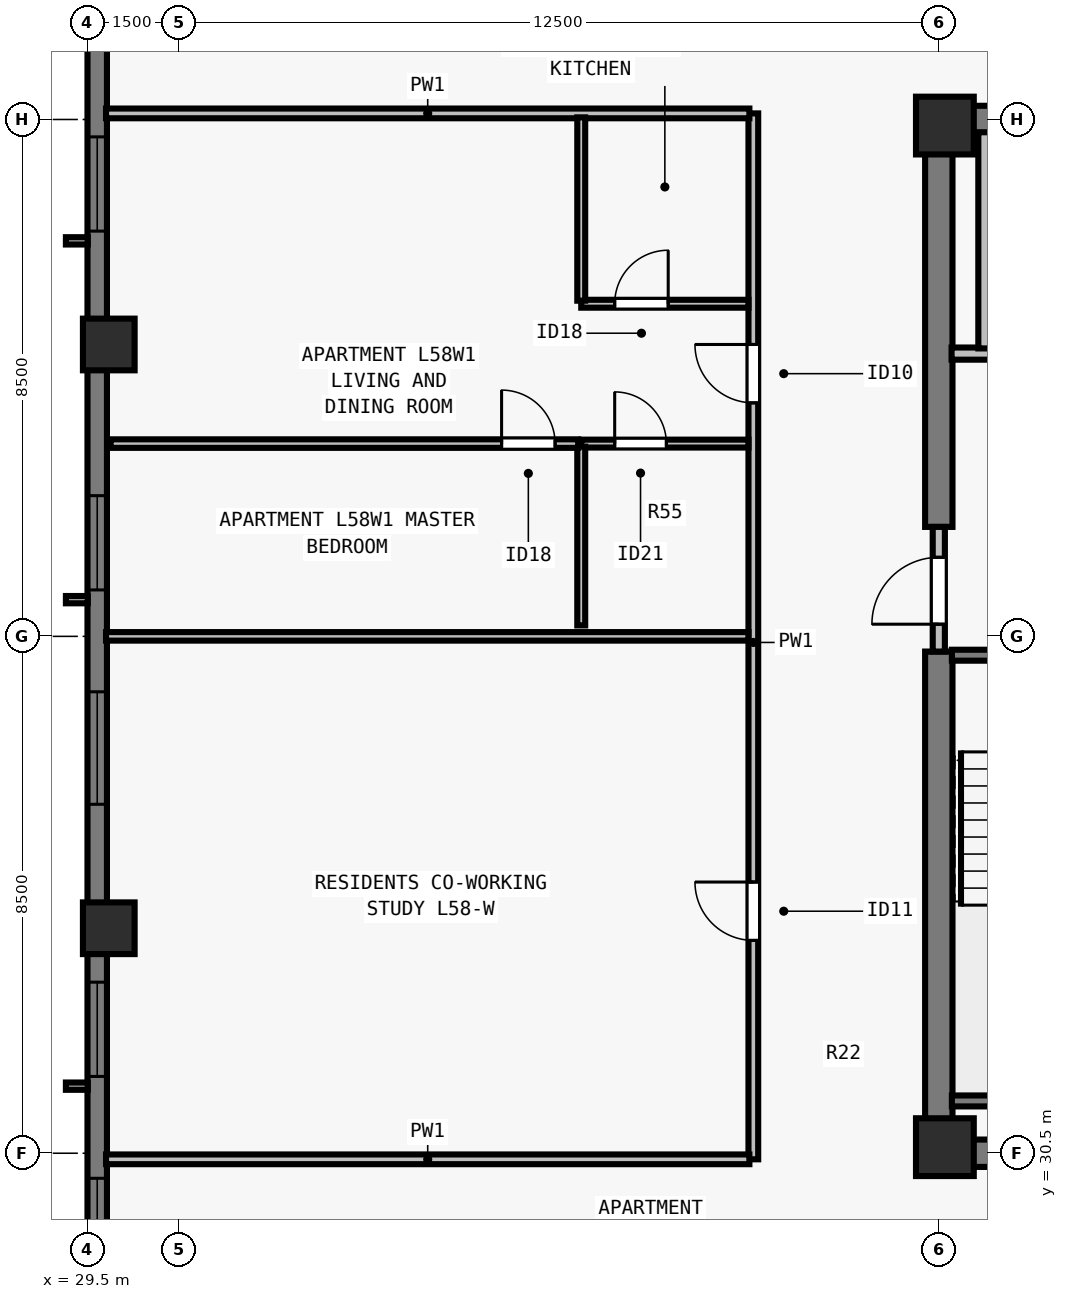
"""IFC4 building model, lengths in metres.
Left out: names, types, materials, properties, quantities, classifications, styles, units other than length and angle.
Written with IfcOpenShell. Run it as: python <this file> out.ifc"""

import sys

from ifc_helpers import new_model, si_unit, direction, frame, frame_2d, origin, origin_2d, place, context, subcontext, project, spatial, rectangle, extrude, element, fill, save


model = new_model("IFC4")
c1 = context("Model", 3, precision=1e-05, world=origin(), true_north=direction((0.0, 1.0)))
c2 = subcontext(c1, "Body", "Model", "MODEL_VIEW")
j1 = project(units=[si_unit("LENGTHUNIT", "METRE"), si_unit("PLANEANGLEUNIT", "RADIAN")], contexts=[c1])
p1 = place(None, origin())
s1 = spatial("IfcSite", under=j1, at=p1, CompositionType="ELEMENT")
p2 = place(p1, origin())
s2 = spatial("IfcBuilding", under=s1, at=p2, CompositionType="ELEMENT")
p3 = place(p2, frame((0.0, 0.0, 213.0)))
s3 = spatial("IfcBuildingStorey", under=s2, at=p3, CompositionType="ELEMENT", Elevation=213.0)
for number, where, z_axis, x_axis in (
    (1, (43.6, 30.6, 0.0), (0.0, 0.0, 1.0), (1.0, 0.0, 0.0)),
    (2, (43.6, 47.4, 0.0), (0.0, 0.0, 1.0), (1.0, 0.0, 0.0)),
):
    element("IfcColumn", number, at=place(p3, frame(where, z_axis=z_axis, x_axis=x_axis)), inside=s3, PredefinedType="COLUMN", context=c2, shape_type="SweptSolid", body=[
        extrude(rectangle(XDim=0.95, YDim=0.95, at=origin_2d()), origin(), (0.0, 0.0, 1.0), 3.5),
    ])
for number, where, z_axis, x_axis in (
    (3, (29.85, 43.8, 0.0), (0.0, 0.0, 1.0), (0.0, 1.0, 0.0)),
    (4, (29.85, 34.2, 0.0), (0.0, 0.0, 1.0), (0.0, 1.0, 0.0)),
):
    element("IfcColumn", number, at=place(p3, frame(where, z_axis=z_axis, x_axis=x_axis)), inside=s3, PredefinedType="COLUMN", context=c2, shape_type="SweptSolid", body=[
        extrude(rectangle(XDim=0.85, YDim=0.85, at=origin_2d()), origin(), (0.0, 0.0, 1.0), 3.5),
    ])
p4 = place(p3, frame((29.66, 21.5, 0.0), z_axis=(0.0, 0.0, 1.0), x_axis=(0.0, 1.0, 0.0)))
e5 = element("IfcWall", 5, at=p4, inside=s3, PredefinedType="SOLIDWALL", context=c2, shape_type="SweptSolid", body=[
    extrude(rectangle(XDim=34.702, YDim=0.32, at=frame_2d((17.351, 0.0))), origin(), (0.0, 0.0, 1.0), 3.29),
])
p5 = place(p4, frame((4.312, 0.0, 0.8)))
e6 = element("IfcOpeningElement", 6, at=p5, cuts=e5, PredefinedType="OPENING", context=c2, shape_type="SweptSolid", body=[
    extrude(rectangle(XDim=1.55, YDim=1.678, at=frame_2d((0.775, 0.839))), frame((0.0, 0.17, 0.0), z_axis=(0.0, -1.0, 0.0), x_axis=(1.0, 0.0, 0.0)), (0.0, 0.0, 1.0), 0.34),
])
p6 = place(p4, frame((6.738, 0.0, 0.8)))
e7 = element("IfcOpeningElement", 7, at=p6, cuts=e5, PredefinedType="OPENING", context=c2, shape_type="SweptSolid", body=[
    extrude(rectangle(XDim=1.85, YDim=1.678, at=frame_2d((0.925, 0.839))), frame((0.0, 0.17, 0.0), z_axis=(0.0, -1.0, 0.0), x_axis=(1.0, 0.0, 0.0)), (0.0, 0.0, 1.0), 0.34),
])
p7 = place(p4, frame((10.263, 0.0, 0.8)))
e8 = element("IfcOpeningElement", 8, at=p7, cuts=e5, PredefinedType="OPENING", context=c2, shape_type="SweptSolid", body=[
    extrude(rectangle(XDim=1.55, YDim=1.678, at=frame_2d((0.775, 0.839))), frame((0.0, 0.17, 0.0), z_axis=(0.0, -1.0, 0.0), x_axis=(1.0, 0.0, 0.0)), (0.0, 0.0, 1.0), 0.34),
])
p8 = place(p4, frame((14.738, 0.0, 0.8)))
e9 = element("IfcOpeningElement", 9, at=p8, cuts=e5, PredefinedType="OPENING", context=c2, shape_type="SweptSolid", body=[
    extrude(rectangle(XDim=1.85, YDim=1.678, at=frame_2d((0.925, 0.839))), frame((0.0, 0.17, 0.0), z_axis=(0.0, -1.0, 0.0), x_axis=(1.0, 0.0, 0.0)), (0.0, 0.0, 1.0), 0.34),
])
p9 = place(p4, frame((18.264, 0.0, 0.8)))
e10 = element("IfcOpeningElement", 10, at=p9, cuts=e5, PredefinedType="OPENING", context=c2, shape_type="SweptSolid", body=[
    extrude(rectangle(XDim=1.55, YDim=1.678, at=frame_2d((0.775, 0.839))), frame((0.0, 0.17, 0.0), z_axis=(0.0, -1.0, 0.0), x_axis=(1.0, 0.0, 0.0)), (0.0, 0.0, 1.0), 0.34),
])
p10 = place(p4, frame((24.164, 0.0, 0.8)))
e11 = element("IfcOpeningElement", 11, at=p10, cuts=e5, PredefinedType="OPENING", context=c2, shape_type="SweptSolid", body=[
    extrude(rectangle(XDim=1.55, YDim=1.678, at=frame_2d((0.775, 0.839))), frame((0.0, 0.17, 0.0), z_axis=(0.0, -1.0, 0.0), x_axis=(1.0, 0.0, 0.0)), (0.0, 0.0, 1.0), 0.34),
])
for number, where, z_axis, x_axis in (
    (12, (43.275, 30.5, 0.0), (0.0, 0.0, 1.0), (1.0, 0.0, 0.0)),
    (13, (43.275, 47.5, 0.0), (0.0, 0.0, 1.0), (1.0, 0.0, 0.0)),
):
    element("IfcWall", number, at=place(p3, frame(where, z_axis=z_axis, x_axis=x_axis)), inside=s3, PredefinedType="SHEAR", context=c2, shape_type="SweptSolid", body=[
        extrude(rectangle(XDim=17.45, YDim=0.45, at=frame_2d((8.725, 0.0))), origin(), (0.0, 0.0, 1.0), 3.29),
    ])
p11 = place(p3, frame((43.5, 30.715, 0.0), z_axis=(0.0, 0.0, 1.0), x_axis=(0.0, 1.0, 0.0)))
e14 = element("IfcWall", 14, at=p11, inside=s3, PredefinedType="SHEAR", context=c2, shape_type="SweptSolid", body=[
    extrude(rectangle(XDim=8.035, YDim=0.45, at=frame_2d((4.018, 0.0))), origin(), (0.0, 0.0, 1.0), 3.29),
])
p12 = place(p3, frame((43.5, 40.8, 0.0), z_axis=(0.0, 0.0, 1.0), x_axis=(0.0, 1.0, 0.0)))
e15 = element("IfcWall", 15, at=p12, inside=s3, PredefinedType="SHEAR", context=c2, shape_type="SweptSolid", body=[
    extrude(rectangle(XDim=6.485, YDim=0.45, at=frame_2d((3.242, 0.0))), origin(), (0.0, 0.0, 1.0), 3.29),
])
p13 = place(p3, frame((43.5, 38.75, 0.0), z_axis=(0.0, 0.0, 1.0), x_axis=(0.0, 1.0, 0.0)))
e16 = element("IfcWall", 16, at=p13, inside=s3, PredefinedType="SOLIDWALL", context=c2, shape_type="SweptSolid", body=[
    extrude(rectangle(XDim=2.05, YDim=0.2, at=frame_2d((1.025, 0.0))), origin(), (0.0, 0.0, 1.0), 3.29),
])
p14 = place(p13, frame((0.45, 0.0, 0.0)))
e17 = element("IfcOpeningElement", 17, at=p14, cuts=e16, PredefinedType="OPENING", context=c2, shape_type="SweptSolid", body=[
    extrude(rectangle(XDim=1.1, YDim=2.15, at=frame_2d((0.55, 1.075))), frame((0.0, 0.11, 0.0), z_axis=(0.0, -1.0, 0.0), x_axis=(1.0, 0.0, 0.0)), (0.0, 0.0, 1.0), 0.22),
])
p15 = place(p3, frame((43.71, 43.65, 0.0), z_axis=(0.0, 0.0, 1.0), x_axis=(1.0, 0.0, 0.0)))
e18 = element("IfcWall", 18, at=p15, inside=s3, PredefinedType="SOLIDWALL", context=c2, shape_type="SweptSolid", body=[
    extrude(rectangle(XDim=3.555, YDim=0.2, at=frame_2d((1.777, 0.0))), origin(), (0.0, 0.0, 1.0), 3.29),
])
p16 = place(p15, frame((1.16, 0.0, 0.0)))
e19 = element("IfcOpeningElement", 19, at=p16, cuts=e18, PredefinedType="OPENING", context=c2, shape_type="SweptSolid", body=[
    extrude(rectangle(XDim=1.1, YDim=2.2, at=frame_2d((0.55, 1.1))), frame((0.0, 0.11, 0.0), z_axis=(0.0, -1.0, 0.0), x_axis=(1.0, 0.0, 0.0)), (0.0, 0.0, 1.0), 0.22),
])
p17 = place(p3, frame((44.25, 43.735, 0.0), z_axis=(0.0, 0.0, 1.0), x_axis=(0.0, 1.0, 0.0)))
e20 = element("IfcWall", 20, at=p17, inside=s3, PredefinedType="SOLIDWALL", context=c2, shape_type="SweptSolid", body=[
    extrude(rectangle(XDim=3.555, YDim=0.2, at=frame_2d((1.777, 0.0))), origin(), (0.0, 0.0, 1.0), 3.29),
])
p18 = place(p3, frame((40.45, 30.4, 0.0), z_axis=(0.0, 0.0, 1.0), x_axis=(0.0, 1.0, 0.0)))
e21 = element("IfcWall", 21, at=p18, inside=s3, PredefinedType="PARTITIONING", context=c2, shape_type="SweptSolid", body=[
    extrude(rectangle(XDim=17.2, YDim=0.16, at=frame_2d((8.6, 0.0))), origin(), (0.0, 0.0, 1.0), 3.29),
])
p19 = place(p18, frame((3.6, 0.0, 0.0)))
e22 = element("IfcOpeningElement", 22, at=p19, cuts=e21, PredefinedType="OPENING", context=c2, shape_type="SweptSolid", body=[
    extrude(rectangle(XDim=0.96, YDim=2.12, at=frame_2d((0.48, 1.06))), frame((0.0, 0.09, 0.0), z_axis=(0.0, -1.0, 0.0), x_axis=(1.0, 0.0, 0.0)), (0.0, 0.0, 1.0), 0.18),
])
p20 = place(p18, frame((12.44, 0.0, 0.0)))
e23 = element("IfcOpeningElement", 23, at=p20, cuts=e21, PredefinedType="OPENING", context=c2, shape_type="SweptSolid", body=[
    extrude(rectangle(XDim=0.96, YDim=2.18, at=frame_2d((0.48, 1.09))), frame((0.0, 0.09, 0.0), z_axis=(0.0, -1.0, 0.0), x_axis=(1.0, 0.0, 0.0)), (0.0, 0.0, 1.0), 0.18),
])
for number, where, z_axis, x_axis in (
    (24, (29.805, 30.4, 0.0), (0.0, 0.0, 1.0), (1.0, 0.0, 0.0)),
    (25, (29.805, 47.6, 0.0), (0.0, 0.0, 1.0), (1.0, 0.0, 0.0)),
):
    element("IfcWall", number, at=place(p3, frame(where, z_axis=z_axis, x_axis=x_axis)), inside=s3, PredefinedType="PARTITIONING", context=c2, shape_type="SweptSolid", body=[
        extrude(rectangle(XDim=10.58, YDim=0.16, at=frame_2d((5.29, 0.0))), origin(), (0.0, 0.0, 1.0), 3.29),
    ])
p21 = place(p3, frame((29.805, 39.0, 0.0), z_axis=(0.0, 0.0, 1.0), x_axis=(1.0, 0.0, 0.0)))
e26 = element("IfcWall", 26, at=p21, inside=s3, PredefinedType="PARTITIONING", context=c2, shape_type="SweptSolid", body=[
    extrude(rectangle(XDim=10.565, YDim=0.14, at=frame_2d((5.283, 0.0))), origin(), (0.0, 0.0, 1.0), 2.958),
])
p22 = place(p3, frame((37.62, 42.17, 0.0), z_axis=(0.0, 0.0, 1.0), x_axis=(1.0, 0.0, 0.0)))
e27 = element("IfcWall", 27, at=p22, inside=s3, PredefinedType="PLUMBINGWALL", context=c2, shape_type="SweptSolid", body=[
    extrude(rectangle(XDim=2.75, YDim=0.13, at=frame_2d((1.375, 0.0))), origin(), (0.0, 0.0, 1.0), 2.958),
])
p23 = place(p22, frame((0.55, 0.0, 0.0)))
e28 = element("IfcOpeningElement", 28, at=p23, cuts=e27, PredefinedType="OPENING", context=c2, shape_type="SweptSolid", body=[
    extrude(rectangle(XDim=0.85, YDim=2.08, at=frame_2d((0.425, 1.04))), frame((0.0, 0.075, 0.0), z_axis=(0.0, -1.0, 0.0), x_axis=(1.0, 0.0, 0.0)), (0.0, 0.0, 1.0), 0.15),
])
p24 = place(p3, frame((37.62, 39.18, 0.0), z_axis=(0.0, 0.0, 1.0), x_axis=(0.0, 1.0, 0.0)))
e29 = element("IfcWall", 29, at=p24, inside=s3, PredefinedType="PLUMBINGWALL", context=c2, shape_type="SweptSolid", body=[
    extrude(rectangle(XDim=2.94, YDim=0.13, at=frame_2d((1.47, 0.0))), origin(), (0.0, 0.0, 1.0), 3.29),
])
p25 = place(p3, frame((37.62, 44.47, 0.0), z_axis=(0.0, 0.0, 1.0), x_axis=(1.0, 0.0, 0.0)))
e30 = element("IfcWall", 30, at=p25, inside=s3, PredefinedType="PLUMBINGWALL", context=c2, shape_type="SweptSolid", body=[
    extrude(rectangle(XDim=2.75, YDim=0.13, at=frame_2d((1.375, 0.0))), origin(), (0.0, 0.0, 1.0), 3.29),
])
p26 = place(p25, frame((0.55, 0.0, 0.0)))
e31 = element("IfcOpeningElement", 31, at=p26, cuts=e30, PredefinedType="OPENING", context=c2, shape_type="SweptSolid", body=[
    extrude(rectangle(XDim=0.88, YDim=2.1, at=frame_2d((0.44, 1.05))), frame((0.0, 0.075, 0.0), z_axis=(0.0, -1.0, 0.0), x_axis=(1.0, 0.0, 0.0)), (0.0, 0.0, 1.0), 0.15),
])
p27 = place(p3, frame((37.62, 44.52, 0.0), z_axis=(0.0, 0.0, 1.0), x_axis=(0.0, 1.0, 0.0)))
e32 = element("IfcWall", 32, at=p27, inside=s3, PredefinedType="PLUMBINGWALL", context=c2, shape_type="SweptSolid", body=[
    extrude(rectangle(XDim=3.015, YDim=0.13, at=frame_2d((1.507, 0.0))), origin(), (0.0, 0.0, 1.0), 3.29),
])
p28 = place(p3, frame((29.88, 42.17, 0.0), z_axis=(0.0, 0.0, 1.0), x_axis=(1.0, 0.0, 0.0)))
e33 = element("IfcWall", 33, at=p28, inside=s3, PredefinedType="PARTITIONING", context=c2, shape_type="SweptSolid", body=[
    extrude(rectangle(XDim=7.69, YDim=0.14, at=frame_2d((3.845, 0.0))), origin(), (0.0, 0.0, 1.0), 3.29),
])
p29 = place(p28, frame((6.43, 0.0, 0.0)))
e34 = element("IfcOpeningElement", 34, at=p29, cuts=e33, PredefinedType="OPENING", context=c2, shape_type="SweptSolid", body=[
    extrude(rectangle(XDim=0.88, YDim=2.1, at=frame_2d((0.44, 1.05))), frame((0.0, 0.08, 0.0), z_axis=(0.0, -1.0, 0.0), x_axis=(1.0, 0.0, 0.0)), (0.0, 0.0, 1.0), 0.16),
])
p30 = place(p3, frame((43.715, 38.69, 0.0), z_axis=(0.0, 0.0, 1.0), x_axis=(1.0, 0.0, 0.0)))
e35 = element("IfcWall", 35, at=p30, inside=s3, PredefinedType="SOLIDWALL", context=c2, shape_type="SweptSolid", body=[
    extrude(rectangle(XDim=3.28, YDim=0.18, at=frame_2d((1.64, 0.0))), origin(), (0.0, 0.0, 1.0), 3.29),
])
p31 = place(p30, frame((1.165, 0.0, 0.0)))
e36 = element("IfcOpeningElement", 36, at=p31, cuts=e35, PredefinedType="OPENING", context=c2, shape_type="SweptSolid", body=[
    extrude(rectangle(XDim=0.95, YDim=2.15, at=frame_2d((0.475, 1.075))), frame((0.0, 0.1, 0.0), z_axis=(0.0, -1.0, 0.0), x_axis=(1.0, 0.0, 0.0)), (0.0, 0.0, 1.0), 0.2),
])
p32 = place(p3, frame((43.715, 31.36, 0.0), z_axis=(0.0, 0.0, 1.0), x_axis=(1.0, 0.0, 0.0)))
e37 = element("IfcWall", 37, at=p32, inside=s3, PredefinedType="SOLIDWALL", context=c2, shape_type="SweptSolid", body=[
    extrude(rectangle(XDim=3.28, YDim=0.18, at=frame_2d((1.64, 0.0))), origin(), (0.0, 0.0, 1.0), 3.29),
])
p33 = place(p6, origin())
e38 = element("IfcWindow", 38, at=p33, inside=s3, PartitioningType="SINGLE_PANEL", PredefinedType="WINDOW", context=c2, shape_type="SweptSolid", body=[
    extrude(rectangle(XDim=1.85, YDim=1.678, at=frame_2d((0.925, 0.839))), frame((0.0, -0.05, 0.0), z_axis=(0.0, -1.0, 0.0), x_axis=(1.0, 0.0, 0.0)), (0.0, 0.0, 1.0), 0.06),
])
fill(e7, e38)
p34 = place(p7, origin())
e39 = element("IfcWindow", 39, at=p34, inside=s3, PartitioningType="SINGLE_PANEL", PredefinedType="WINDOW", context=c2, shape_type="SweptSolid", body=[
    extrude(rectangle(XDim=1.55, YDim=1.678, at=frame_2d((0.775, 0.839))), frame((0.0, -0.05, 0.0), z_axis=(0.0, -1.0, 0.0), x_axis=(1.0, 0.0, 0.0)), (0.0, 0.0, 1.0), 0.06),
])
fill(e8, e39)
p35 = place(p8, origin())
e40 = element("IfcWindow", 40, at=p35, inside=s3, PartitioningType="SINGLE_PANEL", PredefinedType="WINDOW", context=c2, shape_type="SweptSolid", body=[
    extrude(rectangle(XDim=1.85, YDim=1.678, at=frame_2d((0.925, 0.839))), frame((0.0, -0.05, 0.0), z_axis=(0.0, -1.0, 0.0), x_axis=(1.0, 0.0, 0.0)), (0.0, 0.0, 1.0), 0.06),
])
fill(e9, e40)
p36 = place(p9, origin())
e41 = element("IfcWindow", 41, at=p36, inside=s3, PartitioningType="SINGLE_PANEL", PredefinedType="WINDOW", context=c2, shape_type="SweptSolid", body=[
    extrude(rectangle(XDim=1.55, YDim=1.678, at=frame_2d((0.775, 0.839))), frame((0.0, -0.05, 0.0), z_axis=(0.0, -1.0, 0.0), x_axis=(1.0, 0.0, 0.0)), (0.0, 0.0, 1.0), 0.06),
])
fill(e10, e41)
p37 = place(p10, origin())
e42 = element("IfcWindow", 42, at=p37, inside=s3, PartitioningType="SINGLE_PANEL", PredefinedType="WINDOW", context=c2, shape_type="SweptSolid", body=[
    extrude(rectangle(XDim=1.55, YDim=1.678, at=frame_2d((0.775, 0.839))), frame((0.0, -0.05, 0.0), z_axis=(0.0, -1.0, 0.0), x_axis=(1.0, 0.0, 0.0)), (0.0, 0.0, 1.0), 0.06),
])
fill(e11, e42)
p38 = place(p14, origin())
e43 = element("IfcDoor", 43, at=p38, inside=s3, OperationType="SINGLE_SWING_LEFT", PredefinedType="DOOR", context=c2, shape_type="SweptSolid", body=[
    extrude(rectangle(XDim=1.1, YDim=2.15, at=frame_2d((0.55, 1.075))), frame((0.0, 0.025, 0.0), z_axis=(0.0, -1.0, 0.0), x_axis=(1.0, 0.0, 0.0)), (0.0, 0.0, 1.0), 0.05),
])
fill(e17, e43)
p39 = place(p19, origin())
e44 = element("IfcDoor", 44, at=p39, inside=s3, OperationType="SINGLE_SWING_RIGHT", PredefinedType="DOOR", context=c2, shape_type="SweptSolid", body=[
    extrude(rectangle(XDim=0.96, YDim=2.12, at=frame_2d((0.48, 1.06))), frame((0.0, 0.025, 0.0), z_axis=(0.0, -1.0, 0.0), x_axis=(1.0, 0.0, 0.0)), (0.0, 0.0, 1.0), 0.05),
])
fill(e22, e44)
p40 = place(p23, origin())
e45 = element("IfcDoor", 45, at=p40, inside=s3, OperationType="SINGLE_SWING_LEFT", PredefinedType="DOOR", context=c2, shape_type="SweptSolid", body=[
    extrude(rectangle(XDim=0.85, YDim=2.08, at=frame_2d((0.425, 1.04))), frame((0.0, 0.025, 0.0), z_axis=(0.0, -1.0, 0.0), x_axis=(1.0, 0.0, 0.0)), (0.0, 0.0, 1.0), 0.05),
])
fill(e28, e45)
p41 = place(p26, origin())
e46 = element("IfcDoor", 46, at=p41, inside=s3, OperationType="SINGLE_SWING_RIGHT", PredefinedType="DOOR", context=c2, shape_type="SweptSolid", body=[
    extrude(rectangle(XDim=0.88, YDim=2.1, at=frame_2d((0.44, 1.05))), frame((0.0, 0.025, 0.0), z_axis=(0.0, -1.0, 0.0), x_axis=(1.0, 0.0, 0.0)), (0.0, 0.0, 1.0), 0.05),
])
fill(e31, e46)
p42 = place(p29, origin())
e47 = element("IfcDoor", 47, at=p42, inside=s3, OperationType="SINGLE_SWING_LEFT", PredefinedType="DOOR", context=c2, shape_type="SweptSolid", body=[
    extrude(rectangle(XDim=0.88, YDim=2.1, at=frame_2d((0.44, 1.05))), frame((0.0, 0.025, 0.0), z_axis=(0.0, -1.0, 0.0), x_axis=(1.0, 0.0, 0.0)), (0.0, 0.0, 1.0), 0.05),
])
fill(e34, e47)
p43 = place(p20, origin())
e48 = element("IfcDoor", 48, at=p43, inside=s3, OperationType="SINGLE_SWING_RIGHT", PredefinedType="DOOR", context=c2, shape_type="SweptSolid", body=[
    extrude(rectangle(XDim=0.96, YDim=2.18, at=frame_2d((0.48, 1.09))), frame((0.0, 0.025, 0.0), z_axis=(0.0, -1.0, 0.0), x_axis=(1.0, 0.0, 0.0)), (0.0, 0.0, 1.0), 0.05),
])
fill(e23, e48)
save(model, sys.argv[1])
